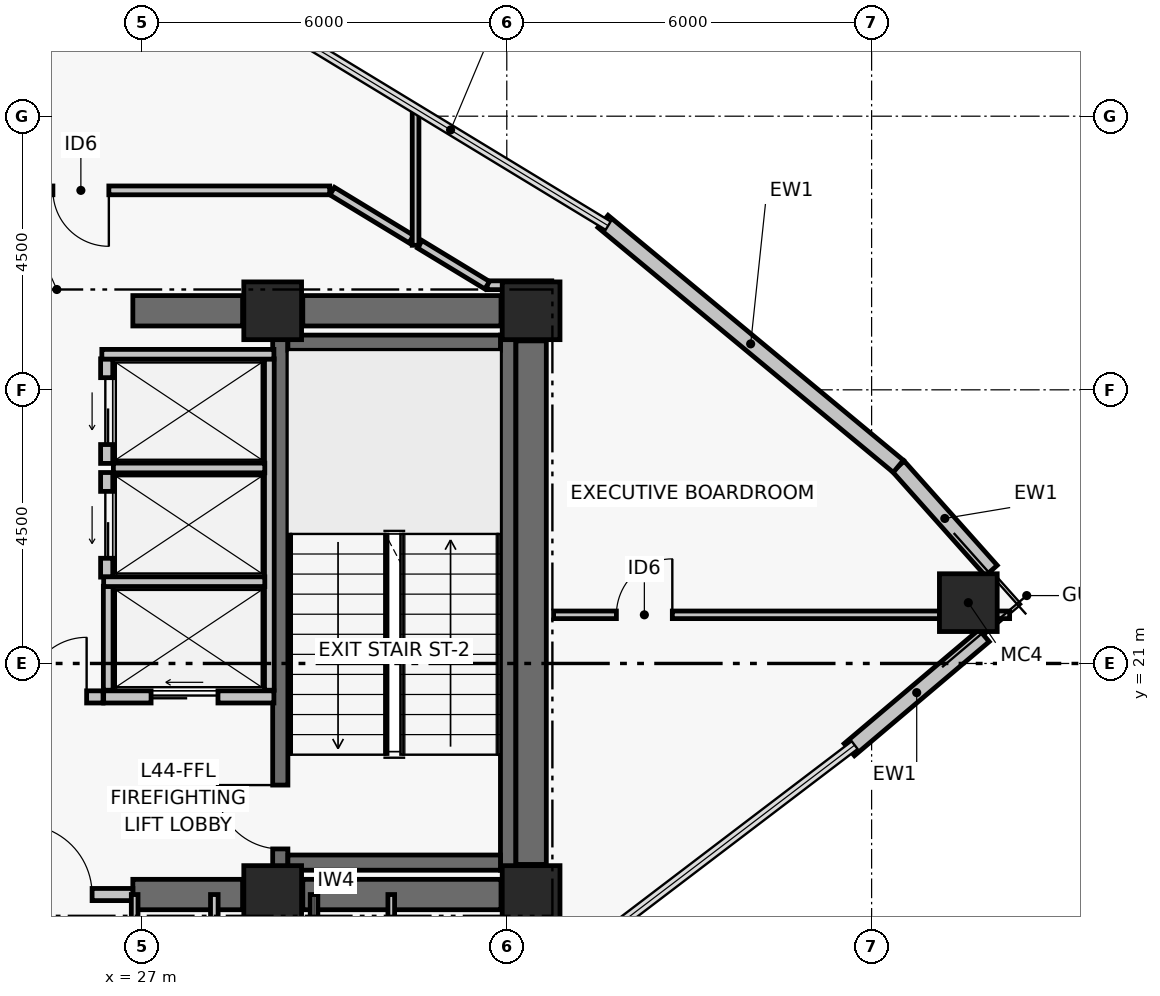
"""IFC4 building model, lengths in metres.
Left out: names, types, materials, properties, quantities, classifications, styles, units other than length and angle.
Written with IfcOpenShell. Run it as: python <this file> out.ifc"""

import sys

from ifc_helpers import new_model, si_unit, direction, frame, frame_2d, origin, origin_2d, place, context, subcontext, project, spatial, rectangle, hollow_rectangle, extrude, element, fill, save


model = new_model("IFC4")
c1 = context("Model", 3, precision=1e-05, world=origin(), true_north=direction((0.0, 1.0)))
c2 = subcontext(c1, "Body", "Model", "MODEL_VIEW")
j1 = project(units=[si_unit("LENGTHUNIT", "METRE"), si_unit("PLANEANGLEUNIT", "RADIAN")], contexts=[c1])
p1 = place(None, origin())
s1 = spatial("IfcSite", under=j1, at=p1, CompositionType="ELEMENT")
p2 = place(p1, origin())
s2 = spatial("IfcBuilding", under=s1, at=p2, CompositionType="ELEMENT")
p3 = place(p2, frame((0.0, 0.0, 176.64)))
s3 = spatial("IfcBuildingStorey", under=s2, at=p3, CompositionType="ELEMENT", Elevation=176.64)
for number, where, z_axis, x_axis in (
    (1, (29.15, 17.2, 0.0), (0.0, 0.0, 1.0), (1.0, 0.0, 0.0)),
    (2, (33.4, 17.2, 0.0), (0.0, 0.0, 1.0), (1.0, 0.0, 0.0)),
    (3, (29.15, 26.8, 0.0), (0.0, 0.0, 1.0), (1.0, 0.0, 0.0)),
    (4, (33.4, 26.8, 0.0), (0.0, 0.0, 1.0), (1.0, 0.0, 0.0)),
):
    element("IfcColumn", number, at=place(p3, frame(where, z_axis=z_axis, x_axis=x_axis)), inside=s3, PredefinedType="COLUMN", context=c2, shape_type="SweptSolid", body=[
        extrude(rectangle(XDim=0.95, YDim=0.95, at=origin_2d()), origin(), (0.0, 0.0, 1.0), 3.72),
    ])
p4 = place(p3, frame((26.85, 17.2, 0.0), z_axis=(0.0, 0.0, 1.0), x_axis=(1.0, 0.0, 0.0)))
e5 = element("IfcWall", 5, at=p4, inside=s3, PredefinedType="SHEAR", context=c2, shape_type="SweptSolid", body=[
    extrude(rectangle(XDim=1.805, YDim=0.5, at=frame_2d((0.902, 0.0))), origin(), (0.0, 0.0, 1.0), 3.5),
])
p5 = place(p3, frame((29.645, 17.2, 0.0), z_axis=(0.0, 0.0, 1.0), x_axis=(1.0, 0.0, 0.0)))
e6 = element("IfcWall", 6, at=p5, inside=s3, PredefinedType="SHEAR", context=c2, shape_type="SweptSolid", body=[
    extrude(rectangle(XDim=3.26, YDim=0.5, at=frame_2d((1.63, 0.0))), origin(), (0.0, 0.0, 1.0), 3.5),
])
p6 = place(p3, frame((26.85, 26.8, 0.0), z_axis=(0.0, 0.0, 1.0), x_axis=(1.0, 0.0, 0.0)))
e7 = element("IfcWall", 7, at=p6, inside=s3, PredefinedType="SHEAR", context=c2, shape_type="SweptSolid", body=[
    extrude(rectangle(XDim=1.805, YDim=0.5, at=frame_2d((0.902, 0.0))), origin(), (0.0, 0.0, 1.0), 3.5),
])
p7 = place(p3, frame((29.645, 26.8, 0.0), z_axis=(0.0, 0.0, 1.0), x_axis=(1.0, 0.0, 0.0)))
e8 = element("IfcWall", 8, at=p7, inside=s3, PredefinedType="SHEAR", context=c2, shape_type="SweptSolid", body=[
    extrude(rectangle(XDim=3.26, YDim=0.5, at=frame_2d((1.63, 0.0))), origin(), (0.0, 0.0, 1.0), 3.5),
])
p8 = place(p3, frame((33.4, 17.695, 0.0), z_axis=(0.0, 0.0, 1.0), x_axis=(0.0, 1.0, 0.0)))
e9 = element("IfcWall", 9, at=p8, inside=s3, PredefinedType="SHEAR", context=c2, shape_type="SweptSolid", body=[
    extrude(rectangle(XDim=8.61, YDim=0.5, at=frame_2d((4.305, 0.0))), origin(), (0.0, 0.0, 1.0), 3.5),
])
p9 = place(p3, frame((29.275, 17.6, 0.0), z_axis=(0.0, 0.0, 1.0), x_axis=(0.0, 1.0, 0.0)))
e10 = element("IfcWall", 10, at=p9, inside=s3, PredefinedType="SHEAR", context=c2, shape_type="SweptSolid", body=[
    extrude(rectangle(XDim=8.8, YDim=0.25, at=frame_2d((4.4, 0.0))), origin(), (0.0, 0.0, 1.0), 3.5),
])
p10 = place(p9, frame((0.35, 0.0, 0.0)))
e11 = element("IfcOpeningElement", 11, at=p10, cuts=e10, PredefinedType="OPENING", context=c2, shape_type="SweptSolid", body=[
    extrude(rectangle(XDim=1.05, YDim=2.08, at=frame_2d((0.525, 1.04))), frame((0.0, 0.135, 0.0), z_axis=(0.0, -1.0, 0.0), x_axis=(1.0, 0.0, 0.0)), (0.0, 0.0, 1.0), 0.27),
])
p11 = place(p3, frame((33.021, 17.6, 0.0), z_axis=(0.0, 0.0, 1.0), x_axis=(0.0, 1.0, 0.0)))
e12 = element("IfcWall", 12, at=p11, inside=s3, PredefinedType="SHEAR", context=c2, shape_type="SweptSolid", body=[
    extrude(rectangle(XDim=8.8, YDim=0.25, at=frame_2d((4.4, 0.0))), origin(), (0.0, 0.0, 1.0), 3.5),
])
for number, where, z_axis, x_axis in (
    (13, (29.4, 17.725, 0.0), (0.0, 0.0, 1.0), (1.0, 0.0, 0.0)),
    (14, (29.4, 26.275, 0.0), (0.0, 0.0, 1.0), (1.0, 0.0, 0.0)),
):
    element("IfcWall", number, at=place(p3, frame(where, z_axis=z_axis, x_axis=x_axis)), inside=s3, PredefinedType="SHEAR", context=c2, shape_type="SweptSolid", body=[
        extrude(rectangle(XDim=3.496, YDim=0.25, at=frame_2d((1.748, 0.0))), origin(), (0.0, 0.0, 1.0), 3.5),
    ])
p12 = place(p3, frame((40.591, 22.0, 0.0), z_axis=(0.0, 0.0, 1.0), x_axis=(1.0, 0.0, 0.0)))
e15 = element("IfcColumn", 15, at=p12, inside=s3, PredefinedType="COLUMN", context=c2, shape_type="SweptSolid", body=[
    extrude(hollow_rectangle(XDim=0.95, YDim=0.95, WallThickness=0.04, at=origin_2d()), origin(), (0.0, 0.0, 1.0), 3.72),
])
p13 = place(p3, frame((40.85, 21.458, 0.0), z_axis=(0.0, 0.0, 1.0), x_axis=(-0.763472391034, -0.645840466469, 0.0)))
e16 = element("IfcWall", 16, at=p13, inside=s3, PredefinedType="PARTITIONING", context=c2, shape_type="SweptSolid", body=[
    extrude(rectangle(XDim=2.904, YDim=0.26, at=frame_2d((1.452, 0.0))), origin(), (0.0, 0.0, 1.0), 3.5),
])
p14 = place(p3, frame((39.439, 24.242, 0.0), z_axis=(0.0, 0.0, 1.0), x_axis=(0.665576459686, -0.746329669993, 0.0)))
e17 = element("IfcWall", 17, at=p14, inside=s3, PredefinedType="PARTITIONING", context=c2, shape_type="SweptSolid", body=[
    extrude(rectangle(XDim=2.298, YDim=0.26, at=frame_2d((1.149, 0.0))), origin(), (0.0, 0.0, 1.0), 3.5),
])
p15 = place(p3, frame((34.583, 28.27, 0.0), z_axis=(0.0, 0.0, 1.0), x_axis=(0.769770017655, -0.638321329676, 0.0)))
e18 = element("IfcWall", 18, at=p15, inside=s3, PredefinedType="PARTITIONING", context=c2, shape_type="SweptSolid", body=[
    extrude(rectangle(XDim=6.309, YDim=0.26, at=frame_2d((3.155, 0.0))), origin(), (0.0, 0.0, 1.0), 3.5),
])
p16 = place(p3, frame((24.35, 17.2, 0.0), z_axis=(0.0, 0.0, 1.0), x_axis=(1.0, 0.0, 0.0)))
e19 = element("IfcWall", 19, at=p16, inside=s3, PredefinedType="PARTITIONING", context=c2, shape_type="SweptSolid", body=[
    extrude(rectangle(XDim=2.5, YDim=0.2, at=frame_2d((1.25, 0.0))), origin(), (0.0, 0.0, 1.0), 2.63),
])
p17 = place(p16, frame((0.68, 0.0, 0.0)))
e20 = element("IfcOpeningElement", 20, at=p17, cuts=e19, PredefinedType="OPENING", context=c2, shape_type="SweptSolid", body=[
    extrude(rectangle(XDim=1.15, YDim=2.08, at=frame_2d((0.575, 1.04))), frame((0.0, 0.11, 0.0), z_axis=(0.0, -1.0, 0.0), x_axis=(1.0, 0.0, 0.0)), (0.0, 0.0, 1.0), 0.22),
])
p18 = place(p3, frame((24.84, 20.45, 0.0), z_axis=(0.0, 0.0, 1.0), x_axis=(1.0, 0.0, 0.0)))
e21 = element("IfcWall", 21, at=p18, inside=s3, PredefinedType="PARTITIONING", context=c2, shape_type="SweptSolid", body=[
    extrude(rectangle(XDim=1.52, YDim=0.2, at=frame_2d((0.76, 0.0))), origin(), (0.0, 0.0, 1.0), 3.5),
])
p19 = place(p18, frame((0.27, 0.0, 0.0)))
e22 = element("IfcOpeningElement", 22, at=p19, cuts=e21, PredefinedType="OPENING", context=c2, shape_type="SweptSolid", body=[
    extrude(rectangle(XDim=0.98, YDim=2.06, at=frame_2d((0.49, 1.03))), frame((0.0, 0.11, 0.0), z_axis=(0.0, -1.0, 0.0), x_axis=(1.0, 0.0, 0.0)), (0.0, 0.0, 1.0), 0.22),
])
p20 = place(p3, frame((26.37, 20.45, 0.0), z_axis=(0.0, 0.0, 1.0), x_axis=(1.0, 0.0, 0.0)))
e23 = element("IfcWall", 23, at=p20, inside=s3, PredefinedType="PARTITIONING", context=c2, shape_type="SweptSolid", body=[
    extrude(rectangle(XDim=2.8, YDim=0.2, at=frame_2d((1.4, 0.0))), origin(), (0.0, 0.0, 1.0), 3.5),
])
p21 = place(p20, frame((0.78, 0.0, 0.0)))
e24 = element("IfcOpeningElement", 24, at=p21, cuts=e23, PredefinedType="OPENING", context=c2, shape_type="SweptSolid", body=[
    extrude(rectangle(XDim=1.1, YDim=2.08, at=frame_2d((0.55, 1.04))), frame((0.0, 0.11, 0.0), z_axis=(0.0, -1.0, 0.0), x_axis=(1.0, 0.0, 0.0)), (0.0, 0.0, 1.0), 0.22),
])
p22 = place(p3, frame((26.42, 22.42, 0.0), z_axis=(0.0, 0.0, 1.0), x_axis=(0.0, 1.0, 0.0)))
e25 = element("IfcWall", 25, at=p22, inside=s3, PredefinedType="PARTITIONING", context=c2, shape_type="SweptSolid", body=[
    extrude(rectangle(XDim=1.72, YDim=0.2, at=frame_2d((0.86, 0.0))), origin(), (0.0, 0.0, 1.0), 3.5),
])
p23 = place(p22, frame((0.31, 0.0, 0.0)))
e26 = element("IfcOpeningElement", 26, at=p23, cuts=e25, PredefinedType="OPENING", context=c2, shape_type="SweptSolid", body=[
    extrude(rectangle(XDim=1.1, YDim=2.08, at=frame_2d((0.55, 1.04))), frame((0.0, 0.11, 0.0), z_axis=(0.0, -1.0, 0.0), x_axis=(1.0, 0.0, 0.0)), (0.0, 0.0, 1.0), 0.22),
])
p24 = place(p3, frame((26.42, 24.29, 0.0), z_axis=(0.0, 0.0, 1.0), x_axis=(0.0, 1.0, 0.0)))
e27 = element("IfcWall", 27, at=p24, inside=s3, PredefinedType="PARTITIONING", context=c2, shape_type="SweptSolid", body=[
    extrude(rectangle(XDim=1.72, YDim=0.2, at=frame_2d((0.86, 0.0))), origin(), (0.0, 0.0, 1.0), 3.5),
])
p25 = place(p24, frame((0.31, 0.0, 0.0)))
e28 = element("IfcOpeningElement", 28, at=p25, cuts=e27, PredefinedType="OPENING", context=c2, shape_type="SweptSolid", body=[
    extrude(rectangle(XDim=1.1, YDim=2.08, at=frame_2d((0.55, 1.04))), frame((0.0, 0.11, 0.0), z_axis=(0.0, -1.0, 0.0), x_axis=(1.0, 0.0, 0.0)), (0.0, 0.0, 1.0), 0.22),
])
p26 = place(p3, frame((29.095, 20.56, 0.0), z_axis=(0.0, 0.0, 1.0), x_axis=(0.0, 1.0, 0.0)))
e29 = element("IfcWall", 29, at=p26, inside=s3, PredefinedType="PARTITIONING", context=c2, shape_type="SweptSolid", body=[
    extrude(rectangle(XDim=5.45, YDim=0.16, at=frame_2d((2.725, 0.0))), origin(), (0.0, 0.0, 1.0), 3.5),
])
p27 = place(p3, frame((26.445, 20.56, 0.0), z_axis=(0.0, 0.0, 1.0), x_axis=(0.0, 1.0, 0.0)))
e30 = element("IfcWall", 30, at=p27, inside=s3, PredefinedType="PARTITIONING", context=c2, shape_type="SweptSolid", body=[
    extrude(rectangle(XDim=1.71, YDim=0.16, at=frame_2d((0.855, 0.0))), origin(), (0.0, 0.0, 1.0), 3.5),
])
p28 = place(p3, frame((26.37, 22.345, 0.0), z_axis=(0.0, 0.0, 1.0), x_axis=(1.0, 0.0, 0.0)))
e31 = element("IfcWall", 31, at=p28, inside=s3, PredefinedType="PARTITIONING", context=c2, shape_type="SweptSolid", body=[
    extrude(rectangle(XDim=2.65, YDim=0.16, at=frame_2d((1.325, 0.0))), origin(), (0.0, 0.0, 1.0), 3.5),
])
p29 = place(p3, frame((26.53, 24.215, 0.0), z_axis=(0.0, 0.0, 1.0), x_axis=(1.0, 0.0, 0.0)))
e32 = element("IfcWall", 32, at=p29, inside=s3, PredefinedType="PARTITIONING", context=c2, shape_type="SweptSolid", body=[
    extrude(rectangle(XDim=2.49, YDim=0.16, at=frame_2d((1.245, 0.0))), origin(), (0.0, 0.0, 1.0), 3.5),
])
p30 = place(p3, frame((26.34, 26.085, 0.0), z_axis=(0.0, 0.0, 1.0), x_axis=(1.0, 0.0, 0.0)))
e33 = element("IfcWall", 33, at=p30, inside=s3, PredefinedType="PARTITIONING", context=c2, shape_type="SweptSolid", body=[
    extrude(rectangle(XDim=2.83, YDim=0.16, at=frame_2d((1.415, 0.0))), origin(), (0.0, 0.0, 1.0), 3.5),
])
p31 = place(p3, frame((26.88, 14.95, 0.0), z_axis=(0.0, 0.0, 1.0), x_axis=(0.0, 1.0, 0.0)))
e34 = element("IfcWall", 34, at=p31, inside=s3, PredefinedType="PARTITIONING", context=c2, shape_type="SweptSolid", body=[
    extrude(rectangle(XDim=2.25, YDim=0.11, at=frame_2d((1.125, 0.0))), origin(), (0.0, 0.0, 1.0), 2.63),
])
for number, where, z_axis, x_axis in (
    (35, (28.19, 14.95, 0.0), (0.0, 0.0, 1.0), (0.0, 1.0, 0.0)),
    (36, (29.83, 14.95, 0.0), (0.0, 0.0, 1.0), (0.0, 1.0, 0.0)),
):
    element("IfcWall", number, at=place(p3, frame(where, z_axis=z_axis, x_axis=x_axis)), inside=s3, PredefinedType="PARTITIONING", context=c2, shape_type="SweptSolid", body=[
        extrude(rectangle(XDim=2.25, YDim=0.125, at=frame_2d((1.125, 0.0))), origin(), (0.0, 0.0, 1.0), 2.63),
    ])
p32 = place(p3, frame((31.1, 14.95, 0.0), z_axis=(0.0, 0.0, 1.0), x_axis=(0.0, 1.0, 0.0)))
e37 = element("IfcWall", 37, at=p32, inside=s3, PredefinedType="PARTITIONING", context=c2, shape_type="SweptSolid", body=[
    extrude(rectangle(XDim=2.25, YDim=0.11, at=frame_2d((1.125, 0.0))), origin(), (0.0, 0.0, 1.0), 2.63),
])
p33 = place(p3, frame((33.74, 27.22, 0.0), z_axis=(0.0, 0.0, 1.0), x_axis=(-1.0, 0.0, 0.0)))
e38 = element("IfcWall", 38, at=p33, inside=s3, PredefinedType="PARTITIONING", context=c2, shape_type="SweptSolid", body=[
    extrude(rectangle(XDim=1.062, YDim=0.145, at=frame_2d((0.531, 0.0))), origin(), (0.0, 0.0, 1.0), 2.63),
])
p34 = place(p3, frame((32.677, 27.22, 0.0), z_axis=(0.0, 0.0, 1.0), x_axis=(-0.854620308946, 0.51925343286, 0.0)))
e39 = element("IfcWall", 39, at=p34, inside=s3, PredefinedType="PARTITIONING", context=c2, shape_type="SweptSolid", body=[
    extrude(rectangle(XDim=1.296, YDim=0.145, at=frame_2d((0.648, 0.0))), origin(), (0.0, 0.0, 1.0), 2.63),
])
p35 = place(p3, frame((31.43, 27.978, 0.0), z_axis=(0.0, 0.0, 1.0), x_axis=(-0.854650301125, 0.519204066612, 0.0)))
e40 = element("IfcWall", 40, at=p35, inside=s3, PredefinedType="PARTITIONING", context=c2, shape_type="SweptSolid", body=[
    extrude(rectangle(XDim=1.522, YDim=0.145, at=frame_2d((0.761, 0.0))), origin(), (0.0, 0.0, 1.0), 2.93),
])
p36 = place(p3, frame((30.087, 28.78, 0.0), z_axis=(0.0, 0.0, 1.0), x_axis=(-1.0, 0.0, 0.0)))
e41 = element("IfcWall", 41, at=p36, inside=s3, PredefinedType="PARTITIONING", context=c2, shape_type="SweptSolid", body=[
    extrude(rectangle(XDim=15.236, YDim=0.145, at=frame_2d((7.618, 0.0))), origin(), (0.0, 0.0, 1.0), 2.73),
])
p37 = place(p36, frame((3.632, 0.0, 0.0)))
e42 = element("IfcOpeningElement", 42, at=p37, cuts=e41, PredefinedType="OPENING", context=c2, shape_type="SweptSolid", body=[
    extrude(rectangle(XDim=0.92, YDim=2.05, at=frame_2d((0.46, 1.025))), frame((0.0, 0.083, 0.0), z_axis=(0.0, -1.0, 0.0), x_axis=(1.0, 0.0, 0.0)), (0.0, 0.0, 1.0), 0.165),
])
p38 = place(p3, frame((31.5, 27.877, 0.0), z_axis=(0.0, 0.0, 1.0), x_axis=(0.0, 1.0, 0.0)))
e43 = element("IfcWall", 43, at=p38, inside=s3, PredefinedType="PARTITIONING", context=c2, shape_type="SweptSolid", body=[
    extrude(rectangle(XDim=2.258, YDim=0.11, at=frame_2d((1.129, 0.0))), origin(), (0.0, 0.0, 1.0), 2.93),
])
p39 = place(p3, frame((33.77, 21.8, 0.0), z_axis=(0.0, 0.0, 1.0), x_axis=(1.0, 0.0, 0.0)))
e44 = element("IfcWall", 44, at=p39, inside=s3, PredefinedType="PARTITIONING", context=c2, shape_type="SweptSolid", body=[
    extrude(rectangle(XDim=7.5, YDim=0.125, at=frame_2d((3.75, 0.0))), origin(), (0.0, 0.0, 1.0), 2.63),
])
p40 = place(p39, frame((1.032, 0.0, 0.0)))
e45 = element("IfcOpeningElement", 45, at=p40, cuts=e44, PredefinedType="OPENING", context=c2, shape_type="SweptSolid", body=[
    extrude(rectangle(XDim=0.92, YDim=2.05, at=frame_2d((0.46, 1.025))), frame((0.0, 0.073, 0.0), z_axis=(0.0, -1.0, 0.0), x_axis=(1.0, 0.0, 0.0)), (0.0, 0.0, 1.0), 0.145),
])
p41 = place(p10, origin())
e46 = element("IfcDoor", 46, at=p41, inside=s3, OperationType="SINGLE_SWING_RIGHT", PredefinedType="DOOR", context=c2, shape_type="SweptSolid", body=[
    extrude(rectangle(XDim=1.05, YDim=2.08, at=frame_2d((0.525, 1.04))), frame((0.0, 0.025, 0.0), z_axis=(0.0, -1.0, 0.0), x_axis=(1.0, 0.0, 0.0)), (0.0, 0.0, 1.0), 0.05),
])
fill(e11, e46)
p42 = place(p17, origin())
e47 = element("IfcDoor", 47, at=p42, inside=s3, OperationType="SINGLE_SWING_LEFT", PredefinedType="DOOR", context=c2, shape_type="SweptSolid", body=[
    extrude(rectangle(XDim=1.15, YDim=2.08, at=frame_2d((0.575, 1.04))), frame((0.0, 0.025, 0.0), z_axis=(0.0, -1.0, 0.0), x_axis=(1.0, 0.0, 0.0)), (0.0, 0.0, 1.0), 0.05),
])
fill(e20, e47)
p43 = place(p19, origin())
e48 = element("IfcDoor", 48, at=p43, inside=s3, OperationType="SINGLE_SWING_RIGHT", PredefinedType="DOOR", context=c2, shape_type="SweptSolid", body=[
    extrude(rectangle(XDim=0.98, YDim=2.06, at=frame_2d((0.49, 1.03))), frame((0.0, 0.025, 0.0), z_axis=(0.0, -1.0, 0.0), x_axis=(1.0, 0.0, 0.0)), (0.0, 0.0, 1.0), 0.05),
])
fill(e22, e48)
p44 = place(p21, origin())
e49 = element("IfcDoor", 49, at=p44, inside=s3, OperationType="DOUBLE_DOOR_SLIDING", PredefinedType="DOOR", context=c2, shape_type="SweptSolid", body=[
    extrude(rectangle(XDim=1.1, YDim=2.08, at=frame_2d((0.55, 1.04))), frame((0.0, 0.025, 0.0), z_axis=(0.0, -1.0, 0.0), x_axis=(1.0, 0.0, 0.0)), (0.0, 0.0, 1.0), 0.05),
])
fill(e24, e49)
p45 = place(p23, origin())
e50 = element("IfcDoor", 50, at=p45, inside=s3, OperationType="DOUBLE_DOOR_SLIDING", PredefinedType="DOOR", context=c2, shape_type="SweptSolid", body=[
    extrude(rectangle(XDim=1.1, YDim=2.08, at=frame_2d((0.55, 1.04))), frame((0.0, 0.025, 0.0), z_axis=(0.0, -1.0, 0.0), x_axis=(1.0, 0.0, 0.0)), (0.0, 0.0, 1.0), 0.05),
])
fill(e26, e50)
p46 = place(p25, origin())
e51 = element("IfcDoor", 51, at=p46, inside=s3, OperationType="DOUBLE_DOOR_SLIDING", PredefinedType="DOOR", context=c2, shape_type="SweptSolid", body=[
    extrude(rectangle(XDim=1.1, YDim=2.08, at=frame_2d((0.55, 1.04))), frame((0.0, 0.025, 0.0), z_axis=(0.0, -1.0, 0.0), x_axis=(1.0, 0.0, 0.0)), (0.0, 0.0, 1.0), 0.05),
])
fill(e28, e51)
p47 = place(p37, origin())
e52 = element("IfcDoor", 52, at=p47, inside=s3, OperationType="SINGLE_SWING_LEFT", PredefinedType="DOOR", context=c2, shape_type="SweptSolid", body=[
    extrude(rectangle(XDim=0.92, YDim=2.05, at=frame_2d((0.46, 1.025))), frame((0.0, 0.025, 0.0), z_axis=(0.0, -1.0, 0.0), x_axis=(1.0, 0.0, 0.0)), (0.0, 0.0, 1.0), 0.05),
])
fill(e42, e52)
p48 = place(p40, origin())
e53 = element("IfcDoor", 53, at=p48, inside=s3, OperationType="SINGLE_SWING_RIGHT", PredefinedType="DOOR", context=c2, shape_type="SweptSolid", body=[
    extrude(rectangle(XDim=0.92, YDim=2.05, at=frame_2d((0.46, 1.025))), frame((0.0, 0.025, 0.0), z_axis=(0.0, -1.0, 0.0), x_axis=(1.0, 0.0, 0.0)), (0.0, 0.0, 1.0), 0.05),
])
fill(e45, e53)
save(model, sys.argv[1])
